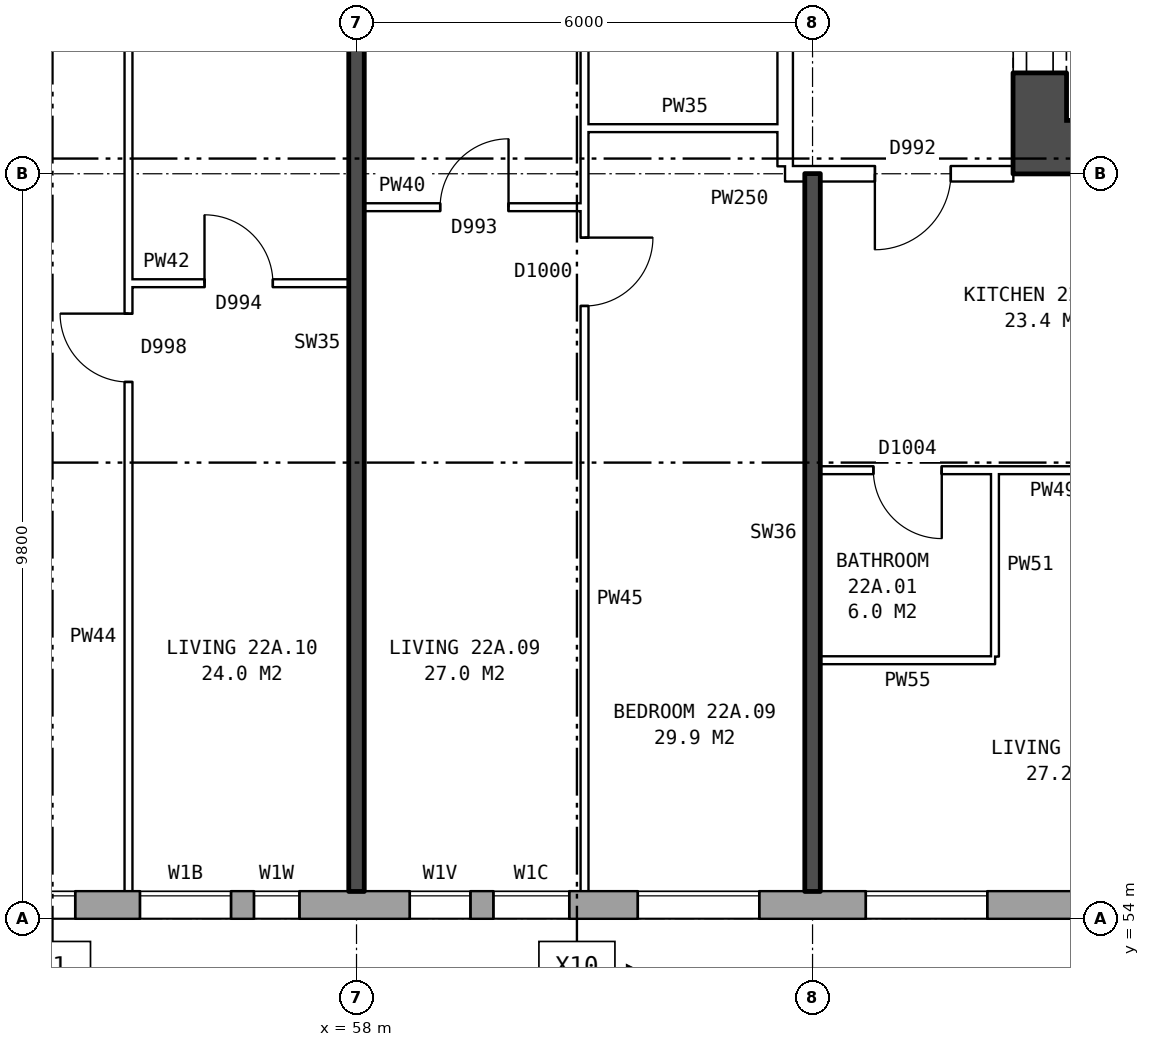
"""IFC4 building model, lengths in metres.
Left out: names, types, materials, properties, quantities, classifications, styles, units other than length and angle.
Written with IfcOpenShell. Run it as: python <this file> out.ifc"""

import sys

from ifc_helpers import new_model, si_unit, direction, frame, frame_2d, origin, place, context, subcontext, project, spatial, rectangle, extrude, element, fill, save


model = new_model("IFC4")
c1 = context("Model", 3, precision=1e-05, world=origin(), true_north=direction((0.0, 1.0)))
c2 = subcontext(c1, "Body", "Model", "MODEL_VIEW")
j1 = project(units=[si_unit("LENGTHUNIT", "METRE"), si_unit("PLANEANGLEUNIT", "RADIAN")], contexts=[c1])
p1 = place(None, origin())
s1 = spatial("IfcSite", under=j1, at=p1, CompositionType="ELEMENT")
p2 = place(p1, origin())
s2 = spatial("IfcBuilding", under=s1, at=p2, CompositionType="ELEMENT")
p3 = place(p2, frame((0.0, 0.0, 80.9)))
s3 = spatial("IfcBuildingStorey", under=s2, at=p3, CompositionType="ELEMENT", Elevation=80.9)
p4 = place(p3, frame((26.325, 54.18, 0.0), z_axis=(0.0, 0.0, 1.0), x_axis=(1.0, 0.0, 0.0)))
e1 = element("IfcWall", 1, at=p4, inside=s3, PredefinedType="STANDARD", context=c2, shape_type="SweptSolid", body=[
    extrude(rectangle(XDim=46.601, YDim=0.36, at=frame_2d((23.3, 0.0))), origin(), (0.0, 0.0, 1.0), 2.85),
])
p5 = place(p4, frame((2.375, 0.0, 0.8)))
e2 = element("IfcOpeningElement", 2, at=p5, cuts=e1, PredefinedType="OPENING", context=c2, shape_type="SweptSolid", body=[
    extrude(rectangle(XDim=1.6, YDim=1.8, at=frame_2d((0.8, 0.9))), frame((0.0, 0.19, 0.0), z_axis=(0.0, -1.0, 0.0), x_axis=(1.0, 0.0, 0.0)), (0.0, 0.0, 1.0), 0.38),
])
p6 = place(p4, frame((5.375, 0.0, 0.8)))
e3 = element("IfcOpeningElement", 3, at=p6, cuts=e1, PredefinedType="OPENING", context=c2, shape_type="SweptSolid", body=[
    extrude(rectangle(XDim=1.6, YDim=1.8, at=frame_2d((0.8, 0.9))), frame((0.0, 0.19, 0.0), z_axis=(0.0, -1.0, 0.0), x_axis=(1.0, 0.0, 0.0)), (0.0, 0.0, 1.0), 0.38),
])
p7 = place(p4, frame((8.375, 0.0, 0.8)))
e4 = element("IfcOpeningElement", 4, at=p7, cuts=e1, PredefinedType="OPENING", context=c2, shape_type="SweptSolid", body=[
    extrude(rectangle(XDim=1.6, YDim=1.8, at=frame_2d((0.8, 0.9))), frame((0.0, 0.19, 0.0), z_axis=(0.0, -1.0, 0.0), x_axis=(1.0, 0.0, 0.0)), (0.0, 0.0, 1.0), 0.38),
])
p8 = place(p4, frame((11.375, 0.0, 0.8)))
e5 = element("IfcOpeningElement", 5, at=p8, cuts=e1, PredefinedType="OPENING", context=c2, shape_type="SweptSolid", body=[
    extrude(rectangle(XDim=1.6, YDim=1.8, at=frame_2d((0.8, 0.9))), frame((0.0, 0.19, 0.0), z_axis=(0.0, -1.0, 0.0), x_axis=(1.0, 0.0, 0.0)), (0.0, 0.0, 1.0), 0.38),
])
p9 = place(p4, frame((15.875, 0.0, 0.8)))
e6 = element("IfcOpeningElement", 6, at=p9, cuts=e1, PredefinedType="OPENING", context=c2, shape_type="SweptSolid", body=[
    extrude(rectangle(XDim=1.2, YDim=1.2, at=frame_2d((0.6, 0.6))), frame((0.0, 0.19, 0.0), z_axis=(0.0, -1.0, 0.0), x_axis=(1.0, 0.0, 0.0)), (0.0, 0.0, 1.0), 0.38),
])
p10 = place(p4, frame((17.375, 0.0, 0.8)))
e7 = element("IfcOpeningElement", 7, at=p10, cuts=e1, PredefinedType="OPENING", context=c2, shape_type="SweptSolid", body=[
    extrude(rectangle(XDim=1.6, YDim=1.8, at=frame_2d((0.8, 0.9))), frame((0.0, 0.19, 0.0), z_axis=(0.0, -1.0, 0.0), x_axis=(1.0, 0.0, 0.0)), (0.0, 0.0, 1.0), 0.38),
])
p11 = place(p4, frame((20.375, 0.0, 0.8)))
e8 = element("IfcOpeningElement", 8, at=p11, cuts=e1, PredefinedType="OPENING", context=c2, shape_type="SweptSolid", body=[
    extrude(rectangle(XDim=1.6, YDim=1.8, at=frame_2d((0.8, 0.9))), frame((0.0, 0.19, 0.0), z_axis=(0.0, -1.0, 0.0), x_axis=(1.0, 0.0, 0.0)), (0.0, 0.0, 1.0), 0.38),
])
p12 = place(p4, frame((23.375, 0.0, 0.8)))
e9 = element("IfcOpeningElement", 9, at=p12, cuts=e1, PredefinedType="OPENING", context=c2, shape_type="SweptSolid", body=[
    extrude(rectangle(XDim=1.6, YDim=1.8, at=frame_2d((0.8, 0.9))), frame((0.0, 0.19, 0.0), z_axis=(0.0, -1.0, 0.0), x_axis=(1.0, 0.0, 0.0)), (0.0, 0.0, 1.0), 0.38),
])
p13 = place(p4, frame((26.375, 0.0, 0.8)))
e10 = element("IfcOpeningElement", 10, at=p13, cuts=e1, PredefinedType="OPENING", context=c2, shape_type="SweptSolid", body=[
    extrude(rectangle(XDim=1.6, YDim=1.8, at=frame_2d((0.8, 0.9))), frame((0.0, 0.19, 0.0), z_axis=(0.0, -1.0, 0.0), x_axis=(1.0, 0.0, 0.0)), (0.0, 0.0, 1.0), 0.38),
])
p14 = place(p4, frame((28.825, 0.0, 0.8)))
e11 = element("IfcOpeningElement", 11, at=p14, cuts=e1, PredefinedType="OPENING", context=c2, shape_type="SweptSolid", body=[
    extrude(rectangle(XDim=1.2, YDim=1.8, at=frame_2d((0.6, 0.9))), frame((0.0, 0.19, 0.0), z_axis=(0.0, -1.0, 0.0), x_axis=(1.0, 0.0, 0.0)), (0.0, 0.0, 1.0), 0.38),
])
p15 = place(p4, frame((32.375, 0.0, 1.7)))
e12 = element("IfcOpeningElement", 12, at=p15, cuts=e1, PredefinedType="OPENING", context=c2, shape_type="SweptSolid", body=[
    extrude(rectangle(XDim=0.8, YDim=0.9, at=frame_2d((0.4, 0.45))), frame((0.0, 0.19, 0.0), z_axis=(0.0, -1.0, 0.0), x_axis=(1.0, 0.0, 0.0)), (0.0, 0.0, 1.0), 0.38),
])
p16 = place(p4, frame((35.375, 0.0, 0.8)))
e13 = element("IfcOpeningElement", 13, at=p16, cuts=e1, PredefinedType="OPENING", context=c2, shape_type="SweptSolid", body=[
    extrude(rectangle(XDim=1.6, YDim=1.8, at=frame_2d((0.8, 0.9))), frame((0.0, 0.19, 0.0), z_axis=(0.0, -1.0, 0.0), x_axis=(1.0, 0.0, 0.0)), (0.0, 0.0, 1.0), 0.38),
])
p17 = place(p4, frame((38.375, 0.0, 0.8)))
e14 = element("IfcOpeningElement", 14, at=p17, cuts=e1, PredefinedType="OPENING", context=c2, shape_type="SweptSolid", body=[
    extrude(rectangle(XDim=1.6, YDim=1.8, at=frame_2d((0.8, 0.9))), frame((0.0, 0.19, 0.0), z_axis=(0.0, -1.0, 0.0), x_axis=(1.0, 0.0, 0.0)), (0.0, 0.0, 1.0), 0.38),
])
p18 = place(p4, frame((41.375, 0.0, 0.8)))
e15 = element("IfcOpeningElement", 15, at=p18, cuts=e1, PredefinedType="OPENING", context=c2, shape_type="SweptSolid", body=[
    extrude(rectangle(XDim=1.6, YDim=1.8, at=frame_2d((0.8, 0.9))), frame((0.0, 0.19, 0.0), z_axis=(0.0, -1.0, 0.0), x_axis=(1.0, 0.0, 0.0)), (0.0, 0.0, 1.0), 0.38),
])
p19 = place(p4, frame((44.375, 0.0, 0.8)))
e16 = element("IfcOpeningElement", 16, at=p19, cuts=e1, PredefinedType="OPENING", context=c2, shape_type="SweptSolid", body=[
    extrude(rectangle(XDim=1.6, YDim=1.8, at=frame_2d((0.8, 0.9))), frame((0.0, 0.19, 0.0), z_axis=(0.0, -1.0, 0.0), x_axis=(1.0, 0.0, 0.0)), (0.0, 0.0, 1.0), 0.38),
])
p20 = place(p4, frame((30.325, 0.0, 0.8)))
e17 = element("IfcOpeningElement", 17, at=p20, cuts=e1, PredefinedType="OPENING", context=c2, shape_type="SweptSolid", body=[
    extrude(rectangle(XDim=0.6, YDim=0.9, at=frame_2d((0.3, 0.45))), frame((0.0, 0.19, 0.0), z_axis=(0.0, -1.0, 0.0), x_axis=(1.0, 0.0, 0.0)), (0.0, 0.0, 1.0), 0.38),
])
p21 = place(p4, frame((33.475, 0.0, 0.8)))
e18 = element("IfcOpeningElement", 18, at=p21, cuts=e1, PredefinedType="OPENING", context=c2, shape_type="SweptSolid", body=[
    extrude(rectangle(XDim=1.0, YDim=1.8, at=frame_2d((0.5, 0.9))), frame((0.0, 0.19, 0.0), z_axis=(0.0, -1.0, 0.0), x_axis=(1.0, 0.0, 0.0)), (0.0, 0.0, 1.0), 0.38),
])
p22 = place(p3, frame((66.99, 64.5, 0.0), z_axis=(0.0, 0.0, 1.0), x_axis=(0.0, 1.0, 0.0)))
e19 = element("IfcWall", 19, at=p22, inside=s3, PredefinedType="SHEAR", context=c2, shape_type="SweptSolid", body=[
    extrude(rectangle(XDim=11.0, YDim=0.7, at=frame_2d((5.5, 0.0))), origin(), (0.0, 0.0, 1.0), 2.85),
])
p23 = place(p22, frame((0.625, 0.0, 0.0)))
e20 = element("IfcOpeningElement", 20, at=p23, cuts=e19, PredefinedType="OPENING", context=c2, shape_type="SweptSolid", body=[
    extrude(rectangle(XDim=1.1, YDim=2.1, at=frame_2d((0.55, 1.05))), frame((0.0, 0.36, 0.0), z_axis=(0.0, -1.0, 0.0), x_axis=(1.0, 0.0, 0.0)), (0.0, 0.0, 1.0), 0.72),
])
p24 = place(p22, frame((9.2, 0.0, 0.0)))
e21 = element("IfcOpeningElement", 21, at=p24, cuts=e19, PredefinedType="OPENING", context=c2, shape_type="SweptSolid", body=[
    extrude(rectangle(XDim=1.1, YDim=2.1, at=frame_2d((0.55, 1.05))), frame((0.0, 0.36, 0.0), z_axis=(0.0, -1.0, 0.0), x_axis=(1.0, 0.0, 0.0)), (0.0, 0.0, 1.0), 0.72),
])
p25 = place(p3, frame((66.64, 64.15, 0.0), z_axis=(0.0, 0.0, 1.0), x_axis=(1.0, 0.0, 0.0)))
e22 = element("IfcWall", 22, at=p25, inside=s3, PredefinedType="SHEAR", context=c2, shape_type="SweptSolid", body=[
    extrude(rectangle(XDim=9.0, YDim=0.7, at=frame_2d((4.5, 0.0))), origin(), (0.0, 0.0, 1.0), 2.85),
])
p26 = place(p3, frame((63.64, 63.9, 0.0), z_axis=(0.0, 0.0, 1.0), x_axis=(0.0, 1.0, 0.0)))
e23 = element("IfcWall", 23, at=p26, inside=s3, PredefinedType="PARTITIONING", context=c2, shape_type="SweptSolid", body=[
    extrude(rectangle(XDim=12.2, YDim=0.2, at=frame_2d((6.1, 0.0))), origin(), (0.0, 0.0, 1.0), 2.85),
])
p27 = place(p26, frame((5.1, 0.0, 0.0)))
e24 = element("IfcOpeningElement", 24, at=p27, cuts=e23, PredefinedType="OPENING", context=c2, shape_type="SweptSolid", body=[
    extrude(rectangle(XDim=2.0, YDim=2.1, at=frame_2d((1.0, 1.05))), frame((0.0, 0.11, 0.0), z_axis=(0.0, -1.0, 0.0), x_axis=(1.0, 0.0, 0.0)), (0.0, 0.0, 1.0), 0.22),
])
p28 = place(p3, frame((64.1, 57.4, 0.0), z_axis=(0.0, 0.0, 1.0), x_axis=(1.0, 0.0, 0.0)))
e25 = element("IfcWall", 25, at=p28, inside=s3, PredefinedType="PARTITIONING", context=c2, shape_type="SweptSolid", body=[
    extrude(rectangle(XDim=2.3, YDim=0.1, at=frame_2d((1.15, 0.0))), origin(), (0.0, 0.0, 1.0), 2.85),
])
p29 = place(p3, frame((64.1, 59.9, 0.0), z_axis=(0.0, 0.0, 1.0), x_axis=(1.0, 0.0, 0.0)))
e26 = element("IfcWall", 26, at=p29, inside=s3, PredefinedType="PARTITIONING", context=c2, shape_type="SweptSolid", body=[
    extrude(rectangle(XDim=5.8, YDim=0.1, at=frame_2d((2.9, 0.0))), origin(), (0.0, 0.0, 1.0), 2.85),
])
p30 = place(p29, frame((3.6, 0.0, 0.0)))
e27 = element("IfcOpeningElement", 27, at=p30, cuts=e26, PredefinedType="OPENING", context=c2, shape_type="SweptSolid", body=[
    extrude(rectangle(XDim=0.9, YDim=2.1, at=frame_2d((0.45, 1.05))), frame((0.0, 0.06, 0.0), z_axis=(0.0, -1.0, 0.0), x_axis=(1.0, 0.0, 0.0)), (0.0, 0.0, 1.0), 0.12),
])
p31 = place(p29, frame((0.7, 0.0, 0.0)))
e28 = element("IfcOpeningElement", 28, at=p31, cuts=e26, PredefinedType="OPENING", context=c2, shape_type="SweptSolid", body=[
    extrude(rectangle(XDim=0.9, YDim=2.1, at=frame_2d((0.45, 1.05))), frame((0.0, 0.06, 0.0), z_axis=(0.0, -1.0, 0.0), x_axis=(1.0, 0.0, 0.0)), (0.0, 0.0, 1.0), 0.12),
])
p32 = place(p3, frame((55.0, 62.36, 0.0), z_axis=(0.0, 0.0, 1.0), x_axis=(1.0, 0.0, 0.0)))
e29 = element("IfcWall", 29, at=p32, inside=s3, PredefinedType="PARTITIONING", context=c2, shape_type="SweptSolid", body=[
    extrude(rectangle(XDim=2.9, YDim=0.1, at=frame_2d((1.45, 0.0))), origin(), (0.0, 0.0, 1.0), 2.85),
])
p33 = place(p32, frame((1.0, 0.0, 0.0)))
e30 = element("IfcOpeningElement", 30, at=p33, cuts=e29, PredefinedType="OPENING", context=c2, shape_type="SweptSolid", body=[
    extrude(rectangle(XDim=0.9, YDim=2.1, at=frame_2d((0.45, 1.05))), frame((0.0, 0.06, 0.0), z_axis=(0.0, -1.0, 0.0), x_axis=(1.0, 0.0, 0.0)), (0.0, 0.0, 1.0), 0.12),
])
p34 = place(p3, frame((58.1, 63.36, 0.0), z_axis=(0.0, 0.0, 1.0), x_axis=(1.0, 0.0, 0.0)))
e31 = element("IfcWall", 31, at=p34, inside=s3, PredefinedType="PARTITIONING", context=c2, shape_type="SweptSolid", body=[
    extrude(rectangle(XDim=2.9, YDim=0.1, at=frame_2d((1.45, 0.0))), origin(), (0.0, 0.0, 1.0), 2.85),
])
p35 = place(p34, frame((1.0, 0.0, 0.0)))
e32 = element("IfcOpeningElement", 32, at=p35, cuts=e31, PredefinedType="OPENING", context=c2, shape_type="SweptSolid", body=[
    extrude(rectangle(XDim=0.9, YDim=2.1, at=frame_2d((0.45, 1.05))), frame((0.0, 0.06, 0.0), z_axis=(0.0, -1.0, 0.0), x_axis=(1.0, 0.0, 0.0)), (0.0, 0.0, 1.0), 0.12),
])
p36 = place(p3, frame((63.64, 63.8, 0.0), z_axis=(0.0, 0.0, 1.0), x_axis=(1.0, 0.0, 0.0)))
e33 = element("IfcWall", 33, at=p36, inside=s3, PredefinedType="PARTITIONING", context=c2, shape_type="SweptSolid", body=[
    extrude(rectangle(XDim=3.0, YDim=0.2, at=frame_2d((1.5, 0.0))), origin(), (0.0, 0.0, 1.0), 2.85),
])
p37 = place(p36, frame((1.18, 0.0, 0.0)))
e34 = element("IfcOpeningElement", 34, at=p37, cuts=e33, PredefinedType="OPENING", context=c2, shape_type="SweptSolid", body=[
    extrude(rectangle(XDim=1.0, YDim=2.1, at=frame_2d((0.5, 1.05))), frame((0.0, 0.11, 0.0), z_axis=(0.0, -1.0, 0.0), x_axis=(1.0, 0.0, 0.0)), (0.0, 0.0, 1.0), 0.22),
])
p38 = place(p3, frame((61.0, 64.4, 0.0), z_axis=(0.0, 0.0, 1.0), x_axis=(1.0, 0.0, 0.0)))
e35 = element("IfcWall", 35, at=p38, inside=s3, PredefinedType="PARTITIONING", context=c2, shape_type="SweptSolid", body=[
    extrude(rectangle(XDim=2.64, YDim=0.1, at=frame_2d((1.32, 0.0))), origin(), (0.0, 0.0, 1.0), 2.85),
])
p39 = place(p3, frame((55.0, 54.36, 0.0), z_axis=(0.0, 0.0, 1.0), x_axis=(0.0, 1.0, 0.0)))
e36 = element("IfcWall", 36, at=p39, inside=s3, PredefinedType="PARTITIONING", context=c2, shape_type="SweptSolid", body=[
    extrude(rectangle(XDim=14.34, YDim=0.1, at=frame_2d((7.17, 0.0))), origin(), (0.0, 0.0, 1.0), 2.85),
])
p40 = place(p39, frame((6.7, 0.0, 0.0)))
e37 = element("IfcOpeningElement", 37, at=p40, cuts=e36, PredefinedType="OPENING", context=c2, shape_type="SweptSolid", body=[
    extrude(rectangle(XDim=0.9, YDim=2.1, at=frame_2d((0.45, 1.05))), frame((0.0, 0.06, 0.0), z_axis=(0.0, -1.0, 0.0), x_axis=(1.0, 0.0, 0.0)), (0.0, 0.0, 1.0), 0.12),
])
p41 = place(p39, frame((13.04, 0.0, 0.0)))
e38 = element("IfcOpeningElement", 38, at=p41, cuts=e36, PredefinedType="OPENING", context=c2, shape_type="SweptSolid", body=[
    extrude(rectangle(XDim=0.9, YDim=2.1, at=frame_2d((0.45, 1.05))), frame((0.0, 0.06, 0.0), z_axis=(0.0, -1.0, 0.0), x_axis=(1.0, 0.0, 0.0)), (0.0, 0.0, 1.0), 0.12),
])
p42 = place(p3, frame((58.0, 54.36, 0.0), z_axis=(0.0, 0.0, 1.0), x_axis=(0.0, 1.0, 0.0)))
e39 = element("IfcWall", 39, at=p42, inside=s3, PredefinedType="SOLIDWALL", context=c2, shape_type="SweptSolid", body=[
    extrude(rectangle(XDim=14.44, YDim=0.2, at=frame_2d((7.22, 0.0))), origin(), (0.0, 0.0, 1.0), 2.85),
])
p43 = place(p3, frame((61.0, 54.36, 0.0), z_axis=(0.0, 0.0, 1.0), x_axis=(0.0, 1.0, 0.0)))
e40 = element("IfcWall", 40, at=p43, inside=s3, PredefinedType="PARTITIONING", context=c2, shape_type="SweptSolid", body=[
    extrude(rectangle(XDim=14.34, YDim=0.1, at=frame_2d((7.17, 0.0))), origin(), (0.0, 0.0, 1.0), 2.85),
])
p44 = place(p43, frame((7.7, 0.0, 0.0)))
e41 = element("IfcOpeningElement", 41, at=p44, cuts=e40, PredefinedType="OPENING", context=c2, shape_type="SweptSolid", body=[
    extrude(rectangle(XDim=0.9, YDim=2.1, at=frame_2d((0.45, 1.05))), frame((0.0, 0.06, 0.0), z_axis=(0.0, -1.0, 0.0), x_axis=(1.0, 0.0, 0.0)), (0.0, 0.0, 1.0), 0.12),
])
p45 = place(p43, frame((13.04, 0.0, 0.0)))
e42 = element("IfcOpeningElement", 42, at=p45, cuts=e40, PredefinedType="OPENING", context=c2, shape_type="SweptSolid", body=[
    extrude(rectangle(XDim=0.9, YDim=2.1, at=frame_2d((0.45, 1.05))), frame((0.0, 0.06, 0.0), z_axis=(0.0, -1.0, 0.0), x_axis=(1.0, 0.0, 0.0)), (0.0, 0.0, 1.0), 0.12),
])
p46 = place(p3, frame((64.0, 54.36, 0.0), z_axis=(0.0, 0.0, 1.0), x_axis=(0.0, 1.0, 0.0)))
e43 = element("IfcWall", 43, at=p46, inside=s3, PredefinedType="SOLIDWALL", context=c2, shape_type="SweptSolid", body=[
    extrude(rectangle(XDim=9.44, YDim=0.2, at=frame_2d((4.72, 0.0))), origin(), (0.0, 0.0, 1.0), 2.85),
])
p47 = place(p3, frame((66.4, 57.45, 0.0), z_axis=(0.0, 0.0, 1.0), x_axis=(0.0, 1.0, 0.0)))
e44 = element("IfcWall", 44, at=p47, inside=s3, PredefinedType="PARTITIONING", context=c2, shape_type="SweptSolid", body=[
    extrude(rectangle(XDim=2.4, YDim=0.1, at=frame_2d((1.2, 0.0))), origin(), (0.0, 0.0, 1.0), 2.85),
])
p48 = place(p13, origin())
e45 = element("IfcWindow", 45, at=p48, inside=s3, PartitioningType="SINGLE_PANEL", PredefinedType="WINDOW", context=c2, shape_type="SweptSolid", body=[
    extrude(rectangle(XDim=1.6, YDim=1.8, at=frame_2d((0.8, 0.9))), frame((0.0, 0.15, 0.0), z_axis=(0.0, -1.0, 0.0), x_axis=(1.0, 0.0, 0.0)), (0.0, 0.0, 1.0), 0.06),
])
fill(e10, e45)
p49 = place(p14, origin())
e46 = element("IfcWindow", 46, at=p49, inside=s3, PartitioningType="SINGLE_PANEL", PredefinedType="WINDOW", context=c2, shape_type="SweptSolid", body=[
    extrude(rectangle(XDim=1.2, YDim=1.8, at=frame_2d((0.6, 0.9))), frame((0.0, 0.15, 0.0), z_axis=(0.0, -1.0, 0.0), x_axis=(1.0, 0.0, 0.0)), (0.0, 0.0, 1.0), 0.06),
])
fill(e11, e46)
p50 = place(p15, origin())
e47 = element("IfcWindow", 47, at=p50, inside=s3, PartitioningType="SINGLE_PANEL", PredefinedType="WINDOW", context=c2, shape_type="SweptSolid", body=[
    extrude(rectangle(XDim=0.8, YDim=0.9, at=frame_2d((0.4, 0.45))), frame((0.0, 0.15, 0.0), z_axis=(0.0, -1.0, 0.0), x_axis=(1.0, 0.0, 0.0)), (0.0, 0.0, 1.0), 0.06),
])
fill(e12, e47)
p51 = place(p16, origin())
e48 = element("IfcWindow", 48, at=p51, inside=s3, PartitioningType="SINGLE_PANEL", PredefinedType="WINDOW", context=c2, shape_type="SweptSolid", body=[
    extrude(rectangle(XDim=1.6, YDim=1.8, at=frame_2d((0.8, 0.9))), frame((0.0, 0.15, 0.0), z_axis=(0.0, -1.0, 0.0), x_axis=(1.0, 0.0, 0.0)), (0.0, 0.0, 1.0), 0.06),
])
fill(e13, e48)
p52 = place(p17, origin())
e49 = element("IfcWindow", 49, at=p52, inside=s3, PartitioningType="SINGLE_PANEL", PredefinedType="WINDOW", context=c2, shape_type="SweptSolid", body=[
    extrude(rectangle(XDim=1.6, YDim=1.8, at=frame_2d((0.8, 0.9))), frame((0.0, 0.15, 0.0), z_axis=(0.0, -1.0, 0.0), x_axis=(1.0, 0.0, 0.0)), (0.0, 0.0, 1.0), 0.06),
])
fill(e14, e49)
p53 = place(p23, origin())
e50 = element("IfcDoor", 50, at=p53, inside=s3, OperationType="DOUBLE_DOOR_SLIDING", PredefinedType="DOOR", context=c2, shape_type="SweptSolid", body=[
    extrude(rectangle(XDim=1.1, YDim=2.1, at=frame_2d((0.55, 1.05))), frame((0.0, -0.285, 0.0), z_axis=(0.0, -1.0, 0.0), x_axis=(1.0, 0.0, 0.0)), (0.0, 0.0, 1.0), 0.05),
])
fill(e20, e50)
p54 = place(p37, frame((1.0, 0.0, 0.0), z_axis=(0.0, 0.0, 1.0), x_axis=(-1.0, 0.0, 0.0)))
e51 = element("IfcDoor", 51, at=p54, inside=s3, OperationType="SINGLE_SWING_RIGHT", PredefinedType="DOOR", context=c2, shape_type="SweptSolid", body=[
    extrude(rectangle(XDim=1.0, YDim=2.1, at=frame_2d((0.5, 1.05))), frame((0.0, 0.025, 0.0), z_axis=(0.0, -1.0, 0.0), x_axis=(1.0, 0.0, 0.0)), (0.0, 0.0, 1.0), 0.05),
])
fill(e34, e51)
p55 = place(p31, frame((0.9, 0.0, 0.0), z_axis=(0.0, 0.0, 1.0), x_axis=(-1.0, 0.0, 0.0)))
e52 = element("IfcDoor", 52, at=p55, inside=s3, OperationType="SINGLE_SWING_LEFT", PredefinedType="DOOR", context=c2, shape_type="SweptSolid", body=[
    extrude(rectangle(XDim=0.9, YDim=2.1, at=frame_2d((0.45, 1.05))), frame((0.0, 0.025, 0.0), z_axis=(0.0, -1.0, 0.0), x_axis=(1.0, 0.0, 0.0)), (0.0, 0.0, 1.0), 0.05),
])
fill(e28, e52)
p56 = place(p44, frame((0.9, 0.0, 0.0), z_axis=(0.0, 0.0, 1.0), x_axis=(-1.0, 0.0, 0.0)))
e53 = element("IfcDoor", 53, at=p56, inside=s3, OperationType="SINGLE_SWING_LEFT", PredefinedType="DOOR", context=c2, shape_type="SweptSolid", body=[
    extrude(rectangle(XDim=0.9, YDim=2.1, at=frame_2d((0.45, 1.05))), frame((0.0, 0.025, 0.0), z_axis=(0.0, -1.0, 0.0), x_axis=(1.0, 0.0, 0.0)), (0.0, 0.0, 1.0), 0.05),
])
fill(e41, e53)
p57 = place(p35, origin())
e54 = element("IfcDoor", 54, at=p57, inside=s3, OperationType="SINGLE_SWING_RIGHT", PredefinedType="DOOR", context=c2, shape_type="SweptSolid", body=[
    extrude(rectangle(XDim=0.9, YDim=2.1, at=frame_2d((0.45, 1.05))), frame((0.0, 0.025, 0.0), z_axis=(0.0, -1.0, 0.0), x_axis=(1.0, 0.0, 0.0)), (0.0, 0.0, 1.0), 0.05),
])
fill(e32, e54)
p58 = place(p40, origin())
e55 = element("IfcDoor", 55, at=p58, inside=s3, OperationType="SINGLE_SWING_RIGHT", PredefinedType="DOOR", context=c2, shape_type="SweptSolid", body=[
    extrude(rectangle(XDim=0.9, YDim=2.1, at=frame_2d((0.45, 1.05))), frame((0.0, 0.025, 0.0), z_axis=(0.0, -1.0, 0.0), x_axis=(1.0, 0.0, 0.0)), (0.0, 0.0, 1.0), 0.05),
])
fill(e37, e55)
p59 = place(p33, origin())
e56 = element("IfcDoor", 56, at=p59, inside=s3, OperationType="SINGLE_SWING_LEFT", PredefinedType="DOOR", context=c2, shape_type="SweptSolid", body=[
    extrude(rectangle(XDim=0.9, YDim=2.1, at=frame_2d((0.45, 1.05))), frame((0.0, 0.025, 0.0), z_axis=(0.0, -1.0, 0.0), x_axis=(1.0, 0.0, 0.0)), (0.0, 0.0, 1.0), 0.05),
])
fill(e30, e56)
p60 = place(p20, origin())
e57 = element("IfcWindow", 57, at=p60, inside=s3, PartitioningType="SINGLE_PANEL", PredefinedType="WINDOW", context=c2, shape_type="SweptSolid", body=[
    extrude(rectangle(XDim=0.6, YDim=0.9, at=frame_2d((0.3, 0.45))), frame((0.0, 0.15, 0.0), z_axis=(0.0, -1.0, 0.0), x_axis=(1.0, 0.0, 0.0)), (0.0, 0.0, 1.0), 0.06),
])
fill(e17, e57)
p61 = place(p21, origin())
e58 = element("IfcWindow", 58, at=p61, inside=s3, PartitioningType="SINGLE_PANEL", PredefinedType="WINDOW", context=c2, shape_type="SweptSolid", body=[
    extrude(rectangle(XDim=1.0, YDim=1.8, at=frame_2d((0.5, 0.9))), frame((0.0, 0.15, 0.0), z_axis=(0.0, -1.0, 0.0), x_axis=(1.0, 0.0, 0.0)), (0.0, 0.0, 1.0), 0.06),
])
fill(e18, e58)
save(model, sys.argv[1])
